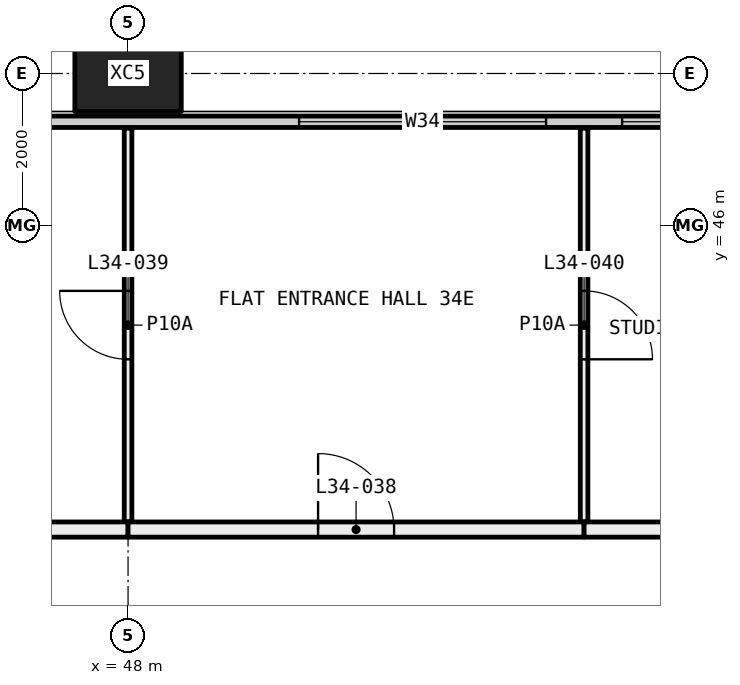
"""IFC4 building model, lengths in metres.
Left out: names, types, materials, properties, quantities, classifications, styles, units other than length and angle.
Written with IfcOpenShell. Run it as: python <this file> out.ifc"""

import sys

from ifc_helpers import new_model, si_unit, direction, frame, frame_2d, origin, origin_2d, place, context, subcontext, project, spatial, rectangle, hollow_rectangle, extrude, element, fill, save


model = new_model("IFC4")
c1 = context("Model", 3, precision=1e-05, world=origin(), true_north=direction((0.0, 1.0)))
c2 = subcontext(c1, "Body", "Model", "MODEL_VIEW")
j1 = project(units=[si_unit("LENGTHUNIT", "METRE"), si_unit("PLANEANGLEUNIT", "RADIAN")], contexts=[c1])
p1 = place(None, origin())
s1 = spatial("IfcSite", under=j1, at=p1, CompositionType="ELEMENT")
p2 = place(p1, origin())
s2 = spatial("IfcBuilding", under=s1, at=p2, CompositionType="ELEMENT")
p3 = place(p2, frame((0.0, 0.0, 131.1)))
s3 = spatial("IfcBuildingStorey", under=s2, at=p3, CompositionType="ELEMENT", Elevation=131.1)
p4 = place(p3, frame((48.0, 48.0, -0.4), z_axis=(0.0, 0.0, 1.0), x_axis=(1.0, 0.0, 0.0)))
e1 = element("IfcColumn", 1, at=p4, inside=s3, PredefinedType="COLUMN", context=c2, shape_type="SweptSolid", body=[
    extrude(hollow_rectangle(XDim=1.4, YDim=1.0, WallThickness=0.055, at=origin_2d()), origin(), (0.0, 0.0, 1.0), 3.45),
])
p5 = place(p3, frame((6.56, 47.365, 0.0), z_axis=(0.0, 0.0, 1.0), x_axis=(1.0, 0.0, 0.0)))
e2 = element("IfcWall", 2, at=p5, inside=s3, PredefinedType="ELEMENTEDWALL", context=c2, shape_type="SweptSolid", body=[
    extrude(rectangle(XDim=58.88, YDim=0.15, at=frame_2d((29.44, 0.0))), origin(), (0.0, 0.0, 1.0), 3.05),
])
p6 = place(p5, frame((0.44, 0.0, 0.45)))
e3 = element("IfcOpeningElement", 3, at=p6, cuts=e2, PredefinedType="OPENING", context=c2, shape_type="SweptSolid", body=[
    extrude(rectangle(XDim=4.5, YDim=2.55, at=frame_2d((2.25, 1.275))), frame((0.0, 0.085, 0.0), z_axis=(0.0, -1.0, 0.0), x_axis=(1.0, 0.0, 0.0)), (0.0, 0.0, 1.0), 0.17),
])
p7 = place(p5, frame((7.69, 0.0, 0.45)))
e4 = element("IfcOpeningElement", 4, at=p7, cuts=e2, PredefinedType="OPENING", context=c2, shape_type="SweptSolid", body=[
    extrude(rectangle(XDim=3.25, YDim=2.55, at=frame_2d((1.625, 1.275))), frame((0.0, 0.085, 0.0), z_axis=(0.0, -1.0, 0.0), x_axis=(1.0, 0.0, 0.0)), (0.0, 0.0, 1.0), 0.17),
])
p8 = place(p5, frame((11.94, 0.0, 0.45)))
e5 = element("IfcOpeningElement", 5, at=p8, cuts=e2, PredefinedType="OPENING", context=c2, shape_type="SweptSolid", body=[
    extrude(rectangle(XDim=3.25, YDim=2.55, at=frame_2d((1.625, 1.275))), frame((0.0, 0.085, 0.0), z_axis=(0.0, -1.0, 0.0), x_axis=(1.0, 0.0, 0.0)), (0.0, 0.0, 1.0), 0.17),
])
p9 = place(p5, frame((19.69, 0.0, 0.45)))
e6 = element("IfcOpeningElement", 6, at=p9, cuts=e2, PredefinedType="OPENING", context=c2, shape_type="SweptSolid", body=[
    extrude(rectangle(XDim=3.25, YDim=2.55, at=frame_2d((1.625, 1.275))), frame((0.0, 0.085, 0.0), z_axis=(0.0, -1.0, 0.0), x_axis=(1.0, 0.0, 0.0)), (0.0, 0.0, 1.0), 0.17),
])
p10 = place(p5, frame((23.94, 0.0, 0.45)))
e7 = element("IfcOpeningElement", 7, at=p10, cuts=e2, PredefinedType="OPENING", context=c2, shape_type="SweptSolid", body=[
    extrude(rectangle(XDim=2.0, YDim=2.55, at=frame_2d((1.0, 1.275))), frame((0.0, 0.085, 0.0), z_axis=(0.0, -1.0, 0.0), x_axis=(1.0, 0.0, 0.0)), (0.0, 0.0, 1.0), 0.17),
])
p11 = place(p5, frame((31.69, 0.0, 0.45)))
e8 = element("IfcOpeningElement", 8, at=p11, cuts=e2, PredefinedType="OPENING", context=c2, shape_type="SweptSolid", body=[
    extrude(rectangle(XDim=3.25, YDim=2.55, at=frame_2d((1.625, 1.275))), frame((0.0, 0.085, 0.0), z_axis=(0.0, -1.0, 0.0), x_axis=(1.0, 0.0, 0.0)), (0.0, 0.0, 1.0), 0.17),
])
p12 = place(p5, frame((35.94, 0.0, 0.45)))
e9 = element("IfcOpeningElement", 9, at=p12, cuts=e2, PredefinedType="OPENING", context=c2, shape_type="SweptSolid", body=[
    extrude(rectangle(XDim=3.25, YDim=2.55, at=frame_2d((1.625, 1.275))), frame((0.0, 0.085, 0.0), z_axis=(0.0, -1.0, 0.0), x_axis=(1.0, 0.0, 0.0)), (0.0, 0.0, 1.0), 0.17),
])
p13 = place(p5, frame((43.69, 0.0, 0.45)))
e10 = element("IfcOpeningElement", 10, at=p13, cuts=e2, PredefinedType="OPENING", context=c2, shape_type="SweptSolid", body=[
    extrude(rectangle(XDim=3.25, YDim=2.55, at=frame_2d((1.625, 1.275))), frame((0.0, 0.085, 0.0), z_axis=(0.0, -1.0, 0.0), x_axis=(1.0, 0.0, 0.0)), (0.0, 0.0, 1.0), 0.17),
])
p14 = place(p5, frame((47.94, 0.0, 0.45)))
e11 = element("IfcOpeningElement", 11, at=p14, cuts=e2, PredefinedType="OPENING", context=c2, shape_type="SweptSolid", body=[
    extrude(rectangle(XDim=2.0, YDim=2.55, at=frame_2d((1.0, 1.275))), frame((0.0, 0.085, 0.0), z_axis=(0.0, -1.0, 0.0), x_axis=(1.0, 0.0, 0.0)), (0.0, 0.0, 1.0), 0.17),
])
p15 = place(p5, frame((53.94, 0.0, 0.45)))
e12 = element("IfcOpeningElement", 12, at=p15, cuts=e2, PredefinedType="OPENING", context=c2, shape_type="SweptSolid", body=[
    extrude(rectangle(XDim=4.5, YDim=2.55, at=frame_2d((2.25, 1.275))), frame((0.0, 0.085, 0.0), z_axis=(0.0, -1.0, 0.0), x_axis=(1.0, 0.0, 0.0)), (0.0, 0.0, 1.0), 0.17),
])
p16 = place(p3, frame((48.0, 42.1, 0.0), z_axis=(0.0, 0.0, 1.0), x_axis=(0.0, 1.0, 0.0)))
e13 = element("IfcWall", 13, at=p16, inside=s3, PredefinedType="PARTITIONING", context=c2, shape_type="SweptSolid", body=[
    extrude(rectangle(XDim=5.18, YDim=0.1, at=frame_2d((2.59, 0.0))), origin(), (0.0, 0.0, 1.0), 3.05),
])
p17 = place(p16, frame((2.14, 0.0, 0.0)))
e14 = element("IfcOpeningElement", 14, at=p17, cuts=e13, PredefinedType="OPENING", context=c2, shape_type="SweptSolid", body=[
    extrude(rectangle(XDim=0.9, YDim=2.1, at=frame_2d((0.45, 1.05))), frame((0.0, 0.06, 0.0), z_axis=(0.0, -1.0, 0.0), x_axis=(1.0, 0.0, 0.0)), (0.0, 0.0, 1.0), 0.12),
])
p18 = place(p3, frame((46.1, 42.0, 0.0), z_axis=(0.0, 0.0, 1.0), x_axis=(1.0, 0.0, 0.0)))
e15 = element("IfcWall", 15, at=p18, inside=s3, PredefinedType="PARTITIONING", context=c2, shape_type="SweptSolid", body=[
    extrude(rectangle(XDim=1.9, YDim=0.2, at=frame_2d((0.95, 0.0))), origin(), (0.0, 0.0, 1.0), 3.05),
])
p19 = place(p3, frame((54.0, 42.1, 0.0), z_axis=(0.0, 0.0, 1.0), x_axis=(0.0, 1.0, 0.0)))
e16 = element("IfcWall", 16, at=p19, inside=s3, PredefinedType="PARTITIONING", context=c2, shape_type="SweptSolid", body=[
    extrude(rectangle(XDim=5.18, YDim=0.1, at=frame_2d((2.59, 0.0))), origin(), (0.0, 0.0, 1.0), 3.05),
])
p20 = place(p19, frame((2.14, 0.0, 0.0)))
e17 = element("IfcOpeningElement", 17, at=p20, cuts=e16, PredefinedType="OPENING", context=c2, shape_type="SweptSolid", body=[
    extrude(rectangle(XDim=0.9, YDim=2.1, at=frame_2d((0.45, 1.05))), frame((0.0, 0.06, 0.0), z_axis=(0.0, -1.0, 0.0), x_axis=(1.0, 0.0, 0.0)), (0.0, 0.0, 1.0), 0.12),
])
p21 = place(p3, frame((48.0, 42.0, 0.0), z_axis=(0.0, 0.0, 1.0), x_axis=(1.0, 0.0, 0.0)))
e18 = element("IfcWall", 18, at=p21, inside=s3, PredefinedType="PARTITIONING", context=c2, shape_type="SweptSolid", body=[
    extrude(rectangle(XDim=6.0, YDim=0.2, at=frame_2d((3.0, 0.0))), origin(), (0.0, 0.0, 1.0), 3.05),
])
p22 = place(p21, frame((2.5, 0.0, 0.0)))
e19 = element("IfcOpeningElement", 19, at=p22, cuts=e18, PredefinedType="OPENING", context=c2, shape_type="SweptSolid", body=[
    extrude(rectangle(XDim=1.0, YDim=2.1, at=frame_2d((0.5, 1.05))), frame((0.0, 0.11, 0.0), z_axis=(0.0, -1.0, 0.0), x_axis=(1.0, 0.0, 0.0)), (0.0, 0.0, 1.0), 0.22),
])
p23 = place(p3, frame((54.0, 42.0, 0.0), z_axis=(0.0, 0.0, 1.0), x_axis=(1.0, 0.0, 0.0)))
e20 = element("IfcWall", 20, at=p23, inside=s3, PredefinedType="PARTITIONING", context=c2, shape_type="SweptSolid", body=[
    extrude(rectangle(XDim=6.0, YDim=0.2, at=frame_2d((3.0, 0.0))), origin(), (0.0, 0.0, 1.0), 3.05),
])
p24 = place(p13, origin())
e21 = element("IfcWindow", 21, at=p24, inside=s3, PartitioningType="SINGLE_PANEL", PredefinedType="WINDOW", context=c2, shape_type="SweptSolid", body=[
    extrude(rectangle(XDim=3.25, YDim=2.55, at=frame_2d((1.625, 1.275))), frame((0.0, 0.03, 0.0), z_axis=(0.0, -1.0, 0.0), x_axis=(1.0, 0.0, 0.0)), (0.0, 0.0, 1.0), 0.06),
])
fill(e10, e21)
p25 = place(p14, origin())
e22 = element("IfcWindow", 22, at=p25, inside=s3, PartitioningType="SINGLE_PANEL", PredefinedType="WINDOW", context=c2, shape_type="SweptSolid", body=[
    extrude(rectangle(XDim=2.0, YDim=2.55, at=frame_2d((1.0, 1.275))), frame((0.0, 0.03, 0.0), z_axis=(0.0, -1.0, 0.0), x_axis=(1.0, 0.0, 0.0)), (0.0, 0.0, 1.0), 0.06),
])
fill(e11, e22)
p26 = place(p22, origin())
e23 = element("IfcDoor", 23, at=p26, inside=s3, OperationType="SINGLE_SWING_RIGHT", PredefinedType="DOOR", context=c2, shape_type="SweptSolid", body=[
    extrude(rectangle(XDim=1.0, YDim=2.1, at=frame_2d((0.5, 1.05))), frame((0.0, 0.025, 0.0), z_axis=(0.0, -1.0, 0.0), x_axis=(1.0, 0.0, 0.0)), (0.0, 0.0, 1.0), 0.05),
])
fill(e19, e23)
p27 = place(p17, origin())
e24 = element("IfcDoor", 24, at=p27, inside=s3, OperationType="SINGLE_SWING_LEFT", PredefinedType="DOOR", context=c2, shape_type="SweptSolid", body=[
    extrude(rectangle(XDim=0.9, YDim=2.1, at=frame_2d((0.45, 1.05))), frame((0.0, 0.025, 0.0), z_axis=(0.0, -1.0, 0.0), x_axis=(1.0, 0.0, 0.0)), (0.0, 0.0, 1.0), 0.05),
])
fill(e14, e24)
p28 = place(p20, frame((0.9, 0.0, 0.0), x_axis=(-1.0, 0.0, 0.0)))
e25 = element("IfcDoor", 25, at=p28, inside=s3, OperationType="SINGLE_SWING_LEFT", PredefinedType="DOOR", context=c2, shape_type="SweptSolid", body=[
    extrude(rectangle(XDim=0.9, YDim=2.1, at=frame_2d((0.45, 1.05))), frame((0.0, 0.025, 0.0), z_axis=(0.0, -1.0, 0.0), x_axis=(1.0, 0.0, 0.0)), (0.0, 0.0, 1.0), 0.05),
])
fill(e17, e25)
save(model, sys.argv[1])
